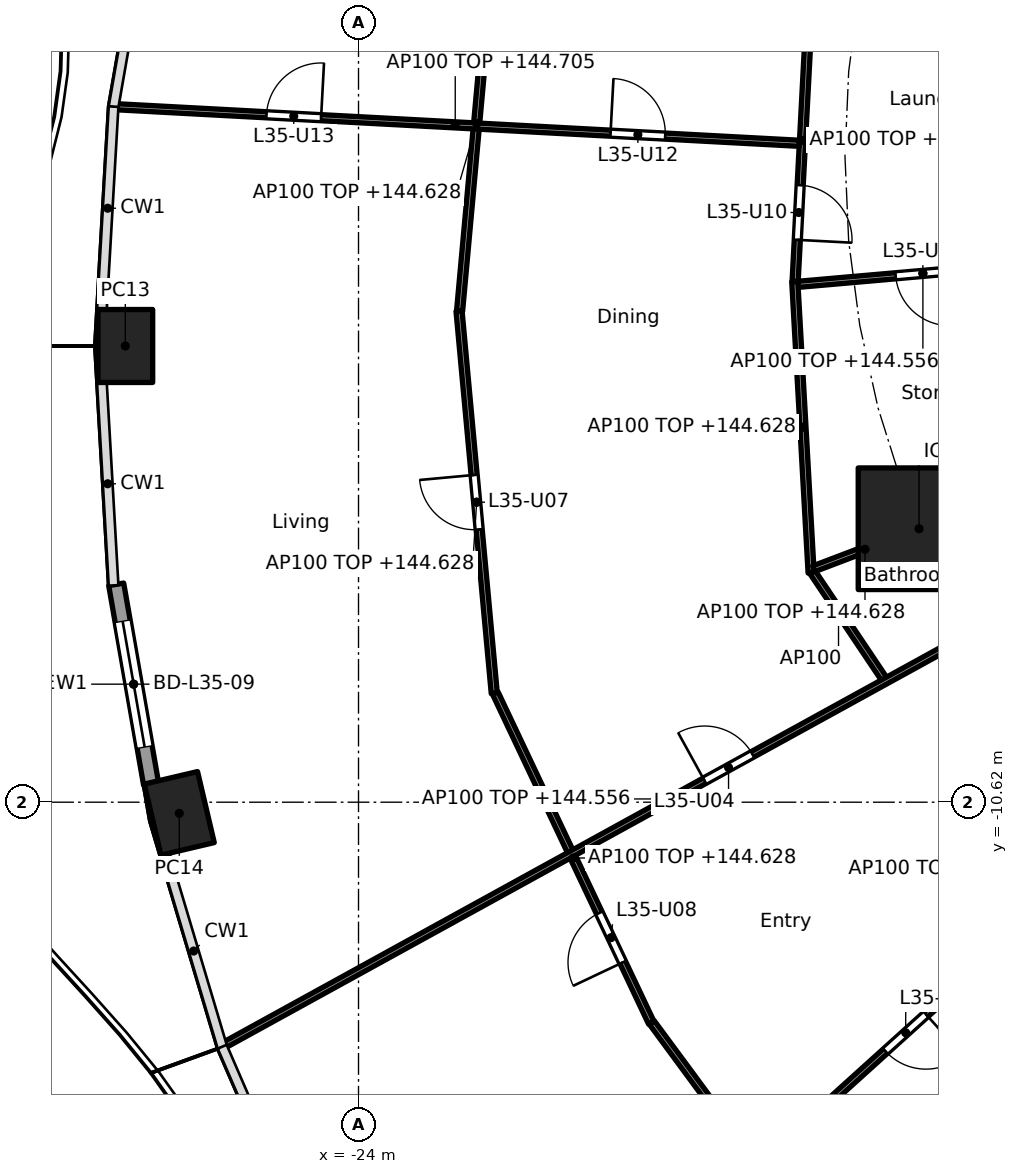
"""IFC4 building model, lengths in metres.
Left out: names, types, materials, properties, quantities, classifications, styles, units other than length and angle.
Written with IfcOpenShell. Run it as: python <this file> out.ifc"""

import sys

from ifc_helpers import new_model, si_unit, direction, frame, frame_2d, origin, origin_2d, place, context, subcontext, project, spatial, rectangle, hollow_rectangle, extrude, element, fill, save


model = new_model("IFC4")
c1 = context("Model", 3, precision=1e-05, world=origin(), true_north=direction((0.0, 1.0)))
c2 = subcontext(c1, "Body", "Model", "MODEL_VIEW")
j1 = project(units=[si_unit("LENGTHUNIT", "METRE"), si_unit("PLANEANGLEUNIT", "RADIAN")], contexts=[c1])
p1 = place(None, origin())
s1 = spatial("IfcSite", under=j1, at=p1, CompositionType="ELEMENT")
p2 = place(p1, origin())
s2 = spatial("IfcBuilding", under=s1, at=p2, CompositionType="ELEMENT")
p3 = place(p2, frame((0.0, 0.0, 141.8)))
s3 = spatial("IfcBuildingStorey", under=s2, at=p3, CompositionType="ELEMENT", Elevation=141.8)
for number, where, z_axis, x_axis in (
    (1, (-27.835, -3.118, 0.0), (0.0, 0.0, 1.0), (0.0, -1.0, 0.0)),
    (2, (-26.948, -10.803, 0.0), (0.0, 0.0, 1.0), (0.229, -0.973, 0.0)),
):
    element("IfcColumn", number, at=place(p3, frame(where, z_axis=z_axis, x_axis=x_axis)), inside=s3, PredefinedType="COLUMN", context=c2, shape_type="SweptSolid", body=[
        extrude(hollow_rectangle(XDim=1.2, YDim=0.9, WallThickness=0.04, at=origin_2d()), origin(), (0.0, 0.0, 1.0), 3.7),
    ])
p4 = place(p3, frame((-14.782, -6.123, 0.0), z_axis=(0.0, 0.0, 1.0), x_axis=(1.0, 0.0, 0.0)))
e3 = element("IfcColumn", 3, at=p4, inside=s3, PredefinedType="COLUMN", context=c2, shape_type="SweptSolid", body=[
    extrude(rectangle(XDim=2.0, YDim=2.0, at=origin_2d()), origin(), (0.0, 0.0, 1.0), 3.7),
])
p5 = place(p3, frame((-27.411, -10.32, 0.0), z_axis=(0.0, 0.0, 1.0), x_axis=(-0.172163521006, 0.985068384446, 0.0)))
e4 = element("IfcWall", 4, at=p5, inside=s3, PredefinedType="SOLIDWALL", context=c2, shape_type="SweptSolid", body=[
    extrude(rectangle(XDim=3.333, YDim=0.25, at=frame_2d((1.666, 0.0))), origin(), (0.0, 0.0, 1.0), 3.44),
])
p6 = place(p5, frame((0.616, 0.0, 0.0)))
e5 = element("IfcOpeningElement", 5, at=p6, cuts=e4, PredefinedType="OPENING", context=c2, shape_type="SweptSolid", body=[
    extrude(rectangle(XDim=2.1, YDim=2.4, at=frame_2d((1.05, 1.2))), frame((0.0, 0.135, 0.0), z_axis=(0.0, -1.0, 0.0), x_axis=(1.0, 0.0, 0.0)), (0.0, 0.0, 1.0), 0.27),
])
p7 = place(p3, frame((-6.149, -14.825, 0.0), z_axis=(0.0, 0.0, 1.0), x_axis=(-0.525406383516, -0.85085141603, 0.0)))
e6 = element("IfcWall", 6, at=p7, inside=s3, PredefinedType="PARTITIONING", context=c2, shape_type="SweptSolid", body=[
    extrude(rectangle(XDim=15.925, YDim=0.2, at=frame_2d((7.962, 0.0))), origin(), (0.0, 0.0, 1.0), 2.828),
])
p8 = place(p3, frame((-16.576, 2.585, 0.0), z_axis=(0.0, 0.0, 1.0), x_axis=(-0.052509224895, -0.998620439056, 0.0)))
e7 = element("IfcWall", 7, at=p8, inside=s3, PredefinedType="PARTITIONING", context=c2, shape_type="SweptSolid", body=[
    extrude(rectangle(XDim=4.649, YDim=0.1, at=frame_2d((2.325, 0.0))), origin(), (0.0, 0.0, 1.0), 2.828),
])
p9 = place(p8, frame((3.062, 0.0, 0.0)))
e8 = element("IfcOpeningElement", 8, at=p9, cuts=e7, PredefinedType="OPENING", context=c2, shape_type="SweptSolid", body=[
    extrude(rectangle(XDim=0.9, YDim=2.1, at=frame_2d((0.45, 1.05))), frame((0.0, 0.06, 0.0), z_axis=(0.0, -1.0, 0.0), x_axis=(1.0, 0.0, 0.0)), (0.0, 0.0, 1.0), 0.12),
])
p10 = place(p3, frame((-21.777, 3.621, 0.0), z_axis=(0.0, 0.0, 1.0), x_axis=(-0.090606877484, -0.995886737412, 0.0)))
e9 = element("IfcWall", 9, at=p10, inside=s3, PredefinedType="PARTITIONING", context=c2, shape_type="SweptSolid", body=[
    extrude(rectangle(XDim=6.189, YDim=0.1, at=frame_2d((3.095, 0.0))), origin(), (0.0, 0.0, 1.0), 2.828),
])
p11 = place(p3, frame((-16.75, 0.216, 0.0), z_axis=(0.0, 0.0, 1.0), x_axis=(-0.998572054207, 0.053421461579, 0.0)))
e10 = element("IfcWall", 10, at=p11, inside=s3, PredefinedType="PARTITIONING", context=c2, shape_type="SweptSolid", body=[
    extrude(rectangle(XDim=11.334, YDim=0.1, at=frame_2d((5.667, 0.0))), origin(), (0.0, 0.0, 1.0), 2.905),
])
p12 = place(p11, frame((2.209, 0.0, 0.0)))
e11 = element("IfcOpeningElement", 11, at=p12, cuts=e10, PredefinedType="OPENING", context=c2, shape_type="SweptSolid", body=[
    extrude(rectangle(XDim=0.9, YDim=2.1, at=frame_2d((0.45, 1.05))), frame((0.0, 0.06, 0.0), z_axis=(0.0, -1.0, 0.0), x_axis=(1.0, 0.0, 0.0)), (0.0, 0.0, 1.0), 0.12),
])
p13 = place(p11, frame((7.876, 0.0, 0.0)))
e12 = element("IfcOpeningElement", 12, at=p13, cuts=e10, PredefinedType="OPENING", context=c2, shape_type="SweptSolid", body=[
    extrude(rectangle(XDim=0.9, YDim=2.1, at=frame_2d((0.45, 1.05))), frame((0.0, 0.06, 0.0), z_axis=(0.0, -1.0, 0.0), x_axis=(1.0, 0.0, 0.0)), (0.0, 0.0, 1.0), 0.12),
])
p14 = place(p3, frame((-12.664, -1.744, 0.0), z_axis=(0.0, 0.0, 1.0), x_axis=(-0.996181049379, -0.08731160781, 0.0)))
e13 = element("IfcWall", 13, at=p14, inside=s3, PredefinedType="PARTITIONING", context=c2, shape_type="SweptSolid", body=[
    extrude(rectangle(XDim=4.125, YDim=0.1, at=frame_2d((2.062, 0.0))), origin(), (0.0, 0.0, 1.0), 2.756),
])
p15 = place(p14, frame((1.612, 0.0, 0.0)))
e14 = element("IfcOpeningElement", 14, at=p15, cuts=e13, PredefinedType="OPENING", context=c2, shape_type="SweptSolid", body=[
    extrude(rectangle(XDim=0.9, YDim=2.1, at=frame_2d((0.45, 1.05))), frame((0.0, 0.06, 0.0), z_axis=(0.0, -1.0, 0.0), x_axis=(1.0, 0.0, 0.0)), (0.0, 0.0, 1.0), 0.12),
])
p16 = place(p3, frame((-16.825, -2.058, 0.0), z_axis=(0.0, 0.0, 1.0), x_axis=(0.055971643802, -0.998432358796, 0.0)))
e15 = element("IfcWall", 15, at=p16, inside=s3, PredefinedType="PARTITIONING", context=c2, shape_type="SweptSolid", body=[
    extrude(rectangle(XDim=4.798, YDim=0.1, at=frame_2d((2.399, 0.0))), origin(), (0.0, 0.0, 1.0), 2.828),
])
p17 = place(p3, frame((-22.347, -2.542, 0.0), z_axis=(0.0, 0.0, 1.0), x_axis=(0.091783634244, -0.995778973711, 0.0)))
e16 = element("IfcWall", 16, at=p17, inside=s3, PredefinedType="PARTITIONING", context=c2, shape_type="SweptSolid", body=[
    extrude(rectangle(XDim=6.315, YDim=0.1, at=frame_2d((3.157, 0.0))), origin(), (0.0, 0.0, 1.0), 2.828),
])
p18 = place(p17, frame((2.708, 0.0, 0.0)))
e17 = element("IfcOpeningElement", 17, at=p18, cuts=e16, PredefinedType="OPENING", context=c2, shape_type="SweptSolid", body=[
    extrude(rectangle(XDim=0.9, YDim=2.1, at=frame_2d((0.45, 1.05))), frame((0.0, 0.06, 0.0), z_axis=(0.0, -1.0, 0.0), x_axis=(1.0, 0.0, 0.0)), (0.0, 0.0, 1.0), 0.12),
])
p19 = place(p3, frame((-12.657, -5.243, 0.0), z_axis=(0.0, 0.0, 1.0), x_axis=(-0.923864733477, -0.382719158442, 0.0)))
e18 = element("IfcWall", 18, at=p19, inside=s3, PredefinedType="PARTITIONING", context=c2, shape_type="SweptSolid", body=[
    extrude(rectangle(XDim=2.25, YDim=0.1, at=frame_2d((1.125, 0.0))), origin(), (0.0, 0.0, 1.0), 3.44),
])
p20 = place(p3, frame((-14.829, -6.141, 0.0), z_axis=(0.0, 0.0, 1.0), x_axis=(-0.934704367514, -0.355426146128, 0.0)))
e19 = element("IfcWall", 19, at=p20, inside=s3, PredefinedType="PARTITIONING", context=c2, shape_type="SweptSolid", body=[
    extrude(rectangle(XDim=1.802, YDim=0.1, at=frame_2d((0.901, 0.0))), origin(), (0.0, 0.0, 1.0), 2.828),
])
p21 = place(p3, frame((-16.532, -6.84, 0.0), z_axis=(0.0, 0.0, 1.0), x_axis=(0.556994773624, -0.830515997531, 0.0)))
e20 = element("IfcWall", 20, at=p21, inside=s3, PredefinedType="PARTITIONING", context=c2, shape_type="SweptSolid", body=[
    extrude(rectangle(XDim=2.183, YDim=0.1, at=frame_2d((1.092, 0.0))), origin(), (0.0, 0.0, 1.0), 3.44),
])
p22 = place(p3, frame((-21.75, -8.826, 0.0), z_axis=(0.0, 0.0, 1.0), x_axis=(0.427736419988, -0.903903509793, 0.0)))
e21 = element("IfcWall", 21, at=p22, inside=s3, PredefinedType="PARTITIONING", context=c2, shape_type="SweptSolid", body=[
    extrude(rectangle(XDim=5.999, YDim=0.1, at=frame_2d((3.0, 0.0))), origin(), (0.0, 0.0, 1.0), 2.828),
])
p23 = place(p22, frame((3.999, 0.0, 0.0)))
e22 = element("IfcOpeningElement", 22, at=p23, cuts=e21, PredefinedType="OPENING", context=c2, shape_type="SweptSolid", body=[
    extrude(rectangle(XDim=0.9, YDim=2.1, at=frame_2d((0.45, 1.05))), frame((0.0, 0.06, 0.0), z_axis=(0.0, -1.0, 0.0), x_axis=(1.0, 0.0, 0.0)), (0.0, 0.0, 1.0), 0.12),
])
p24 = place(p3, frame((-11.426, -6.479, 0.0), z_axis=(0.0, 0.0, 1.0), x_axis=(-0.876110392495, -0.482110547657, 0.0)))
e23 = element("IfcWall", 23, at=p24, inside=s3, PredefinedType="PARTITIONING", context=c2, shape_type="SweptSolid", body=[
    extrude(rectangle(XDim=16.955, YDim=0.1, at=frame_2d((8.478, 0.0))), origin(), (0.0, 0.0, 1.0), 2.756),
])
p25 = place(p24, frame((0.35, 0.0, 0.0)))
e24 = element("IfcOpeningElement", 24, at=p25, cuts=e23, PredefinedType="OPENING", context=c2, shape_type="SweptSolid", body=[
    extrude(rectangle(XDim=0.9, YDim=2.1, at=frame_2d((0.45, 1.05))), frame((0.0, 0.06, 0.0), z_axis=(0.0, -1.0, 0.0), x_axis=(1.0, 0.0, 0.0)), (0.0, 0.0, 1.0), 0.12),
])
p26 = place(p24, frame((6.957, 0.0, 0.0)))
e25 = element("IfcOpeningElement", 25, at=p26, cuts=e23, PredefinedType="OPENING", context=c2, shape_type="SweptSolid", body=[
    extrude(rectangle(XDim=0.9, YDim=2.1, at=frame_2d((0.45, 1.05))), frame((0.0, 0.06, 0.0), z_axis=(0.0, -1.0, 0.0), x_axis=(1.0, 0.0, 0.0)), (0.0, 0.0, 1.0), 0.12),
])
p27 = place(p3, frame((-19.176, -14.244, 0.0), z_axis=(0.0, 0.0, 1.0), x_axis=(0.593532053206, -0.80481035146, 0.0)))
e26 = element("IfcWall", 26, at=p27, inside=s3, PredefinedType="PARTITIONING", context=c2, shape_type="SweptSolid", body=[
    extrude(rectangle(XDim=5.876, YDim=0.1, at=frame_2d((2.938, 0.0))), origin(), (0.0, 0.0, 1.0), 2.828),
])
p28 = place(p3, frame((-8.959, -8.952, 0.0), z_axis=(0.0, 0.0, 1.0), x_axis=(-0.741982736283, -0.670418987692, 0.0)))
e27 = element("IfcWall", 27, at=p28, inside=s3, PredefinedType="PARTITIONING", context=c2, shape_type="SweptSolid", body=[
    extrude(rectangle(XDim=11.371, YDim=0.1, at=frame_2d((5.685, 0.0))), origin(), (0.0, 0.0, 1.0), 2.756),
])
p29 = place(p28, frame((2.009, 0.0, 0.0)))
e28 = element("IfcOpeningElement", 28, at=p29, cuts=e27, PredefinedType="OPENING", context=c2, shape_type="SweptSolid", body=[
    extrude(rectangle(XDim=0.9, YDim=2.1, at=frame_2d((0.45, 1.05))), frame((0.0, 0.06, 0.0), z_axis=(0.0, -1.0, 0.0), x_axis=(1.0, 0.0, 0.0)), (0.0, 0.0, 1.0), 0.12),
])
p30 = place(p28, frame((7.694, 0.0, 0.0)))
e29 = element("IfcOpeningElement", 29, at=p30, cuts=e27, PredefinedType="OPENING", context=c2, shape_type="SweptSolid", body=[
    extrude(rectangle(XDim=0.9, YDim=2.1, at=frame_2d((0.45, 1.05))), frame((0.0, 0.06, 0.0), z_axis=(0.0, -1.0, 0.0), x_axis=(1.0, 0.0, 0.0)), (0.0, 0.0, 1.0), 0.12),
])
p31 = place(p3, frame((-11.109, -13.951, 0.0), z_axis=(0.0, 0.0, 1.0), x_axis=(-0.668488676691, -0.743722319913, 0.0)))
e30 = element("IfcWall", 30, at=p31, inside=s3, PredefinedType="PARTITIONING", context=c2, shape_type="SweptSolid", body=[
    extrude(rectangle(XDim=13.094, YDim=0.1, at=frame_2d((6.547, 0.0))), origin(), (0.0, 0.0, 1.0), 2.828),
])
p32 = place(p31, frame((9.5, 0.0, 0.0)))
e31 = element("IfcOpeningElement", 31, at=p32, cuts=e30, PredefinedType="OPENING", context=c2, shape_type="SweptSolid", body=[
    extrude(rectangle(XDim=0.9, YDim=2.1, at=frame_2d((0.45, 1.05))), frame((0.0, 0.06, 0.0), z_axis=(0.0, -1.0, 0.0), x_axis=(1.0, 0.0, 0.0)), (0.0, 0.0, 1.0), 0.12),
])
p33 = place(p6, origin())
e32 = element("IfcDoor", 32, at=p33, inside=s3, OperationType="SLIDING_TO_LEFT", PredefinedType="DOOR", context=c2, shape_type="SweptSolid", body=[
    extrude(rectangle(XDim=2.1, YDim=2.4, at=frame_2d((1.05, 1.2))), frame((0.0, 0.025, 0.0), z_axis=(0.0, -1.0, 0.0), x_axis=(1.0, 0.0, 0.0)), (0.0, 0.0, 1.0), 0.05),
])
fill(e5, e32)
p34 = place(p26, frame((0.9, 0.0, 0.0), x_axis=(-1.0, 0.0, 0.0)))
e33 = element("IfcDoor", 33, at=p34, inside=s3, OperationType="SINGLE_SWING_LEFT", PredefinedType="DOOR", context=c2, shape_type="SweptSolid", body=[
    extrude(rectangle(XDim=0.9, YDim=2.1, at=frame_2d((0.45, 1.05))), frame((0.0, 0.025, 0.0), z_axis=(0.0, -1.0, 0.0), x_axis=(1.0, 0.0, 0.0)), (0.0, 0.0, 1.0), 0.05),
])
fill(e25, e33)
p35 = place(p30, origin())
e34 = element("IfcDoor", 34, at=p35, inside=s3, OperationType="SINGLE_SWING_LEFT", PredefinedType="DOOR", context=c2, shape_type="SweptSolid", body=[
    extrude(rectangle(XDim=0.9, YDim=2.1, at=frame_2d((0.45, 1.05))), frame((0.0, 0.025, 0.0), z_axis=(0.0, -1.0, 0.0), x_axis=(1.0, 0.0, 0.0)), (0.0, 0.0, 1.0), 0.05),
])
fill(e29, e34)
p36 = place(p18, frame((0.9, 0.0, 0.0), x_axis=(-1.0, 0.0, 0.0)))
e35 = element("IfcDoor", 35, at=p36, inside=s3, OperationType="SINGLE_SWING_RIGHT", PredefinedType="DOOR", context=c2, shape_type="SweptSolid", body=[
    extrude(rectangle(XDim=0.9, YDim=2.1, at=frame_2d((0.45, 1.05))), frame((0.0, 0.025, 0.0), z_axis=(0.0, -1.0, 0.0), x_axis=(1.0, 0.0, 0.0)), (0.0, 0.0, 1.0), 0.05),
])
fill(e17, e35)
p37 = place(p23, frame((0.9, 0.0, 0.0), x_axis=(-1.0, 0.0, 0.0)))
e36 = element("IfcDoor", 36, at=p37, inside=s3, OperationType="SINGLE_SWING_LEFT", PredefinedType="DOOR", context=c2, shape_type="SweptSolid", body=[
    extrude(rectangle(XDim=0.9, YDim=2.1, at=frame_2d((0.45, 1.05))), frame((0.0, 0.025, 0.0), z_axis=(0.0, -1.0, 0.0), x_axis=(1.0, 0.0, 0.0)), (0.0, 0.0, 1.0), 0.05),
])
fill(e22, e36)
p38 = place(p9, origin())
e37 = element("IfcDoor", 37, at=p38, inside=s3, OperationType="SINGLE_SWING_RIGHT", PredefinedType="DOOR", context=c2, shape_type="SweptSolid", body=[
    extrude(rectangle(XDim=0.9, YDim=2.1, at=frame_2d((0.45, 1.05))), frame((0.0, 0.025, 0.0), z_axis=(0.0, -1.0, 0.0), x_axis=(1.0, 0.0, 0.0)), (0.0, 0.0, 1.0), 0.05),
])
fill(e8, e37)
p39 = place(p15, origin())
e38 = element("IfcDoor", 38, at=p39, inside=s3, OperationType="SINGLE_SWING_LEFT", PredefinedType="DOOR", context=c2, shape_type="SweptSolid", body=[
    extrude(rectangle(XDim=0.9, YDim=2.1, at=frame_2d((0.45, 1.05))), frame((0.0, 0.025, 0.0), z_axis=(0.0, -1.0, 0.0), x_axis=(1.0, 0.0, 0.0)), (0.0, 0.0, 1.0), 0.05),
])
fill(e14, e38)
p40 = place(p12, frame((0.9, 0.0, 0.0), x_axis=(-1.0, 0.0, 0.0)))
e39 = element("IfcDoor", 39, at=p40, inside=s3, OperationType="SINGLE_SWING_LEFT", PredefinedType="DOOR", context=c2, shape_type="SweptSolid", body=[
    extrude(rectangle(XDim=0.9, YDim=2.1, at=frame_2d((0.45, 1.05))), frame((0.0, 0.025, 0.0), z_axis=(0.0, -1.0, 0.0), x_axis=(1.0, 0.0, 0.0)), (0.0, 0.0, 1.0), 0.05),
])
fill(e11, e39)
p41 = place(p13, frame((0.9, 0.0, 0.0), x_axis=(-1.0, 0.0, 0.0)))
e40 = element("IfcDoor", 40, at=p41, inside=s3, OperationType="SINGLE_SWING_RIGHT", PredefinedType="DOOR", context=c2, shape_type="SweptSolid", body=[
    extrude(rectangle(XDim=0.9, YDim=2.1, at=frame_2d((0.45, 1.05))), frame((0.0, 0.025, 0.0), z_axis=(0.0, -1.0, 0.0), x_axis=(1.0, 0.0, 0.0)), (0.0, 0.0, 1.0), 0.05),
])
fill(e12, e40)
save(model, sys.argv[1])
